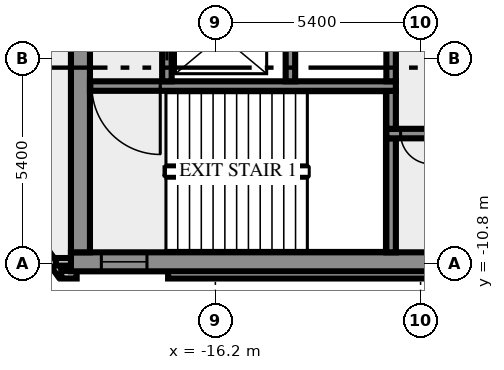
"""IFC4 building model, lengths in metres.
Left out: names, types, materials, properties, quantities, classifications, styles, units other than length and angle.
Written with IfcOpenShell. Run it as: python <this file> out.ifc"""

import sys

from ifc_helpers import new_model, si_unit, direction, frame, frame_2d, origin, place, context, subcontext, project, spatial, rectangle, extrude, element, fill, save


model = new_model("IFC4")
c1 = context("Model", 3, precision=1e-05, world=origin(), true_north=direction((0.0, 1.0)))
c2 = subcontext(c1, "Body", "Model", "MODEL_VIEW")
j1 = project(units=[si_unit("LENGTHUNIT", "METRE"), si_unit("PLANEANGLEUNIT", "RADIAN")], contexts=[c1])
p1 = place(None, origin())
s1 = spatial("IfcSite", under=j1, at=p1, CompositionType="ELEMENT")
p2 = place(p1, origin())
s2 = spatial("IfcBuilding", under=s1, at=p2, CompositionType="ELEMENT")
p3 = place(p2, frame((0.0, 0.0, 327.0)))
s3 = spatial("IfcBuildingStorey", under=s2, at=p3, CompositionType="ELEMENT", Elevation=327.0)
p4 = place(p3, frame((-21.833, -8.909, 0.0), z_axis=(0.0, 0.0, 1.0), x_axis=(0.587766567315, -0.809030569476, 0.0)))
e1 = element("IfcWall", 1, at=p4, inside=s3, PredefinedType="SOLIDWALL", context=c2, shape_type="SweptSolid", body=[
    extrude(rectangle(XDim=2.688, YDim=0.2, at=frame_2d((1.344, 0.0))), origin(), (0.0, 0.0, 1.0), 3.65),
])
p5 = place(p3, frame((-20.256, -11.088, 0.0), z_axis=(0.0, 0.0, 1.0), x_axis=(1.0, 0.0, 0.0)))
e2 = element("IfcWall", 2, at=p5, inside=s3, PredefinedType="SOLIDWALL", context=c2, shape_type="SweptSolid", body=[
    extrude(rectangle(XDim=0.406, YDim=0.2, at=frame_2d((0.203, 0.0))), origin(), (0.0, 0.0, 1.0), 3.65),
])
p6 = place(p3, frame((-17.444, -11.088, 0.0), z_axis=(0.0, 0.0, 1.0), x_axis=(1.0, 0.0, 0.0)))
e3 = element("IfcWall", 3, at=p6, inside=s3, PredefinedType="SOLIDWALL", context=c2, shape_type="SweptSolid", body=[
    extrude(rectangle(XDim=34.888, YDim=0.2, at=frame_2d((17.444, 0.0))), origin(), (0.0, 0.0, 1.0), 3.65),
])
p7 = place(p3, frame((-19.98, -10.75, 0.0), z_axis=(0.0, 0.0, 1.0), x_axis=(-1.0, 0.0, 0.0)))
e4 = element("IfcWall", 4, at=p7, inside=s3, PredefinedType="SOLIDWALL", context=c2, shape_type="SweptSolid", body=[
    extrude(rectangle(XDim=0.417, YDim=0.2, at=frame_2d((0.208, 0.0))), origin(), (0.0, 0.0, 1.0), 3.65),
])
p8 = place(p3, frame((-20.0, -10.75, 0.0), z_axis=(0.0, 0.0, 1.0), x_axis=(1.0, 0.0, 0.0)))
e5 = element("IfcWall", 5, at=p8, inside=s3, PredefinedType="SHEAR", context=c2, shape_type="SweptSolid", body=[
    extrude(rectangle(XDim=40.0, YDim=0.5, at=frame_2d((20.0, 0.0))), origin(), (0.0, 0.0, 1.0), 3.65),
])
p9 = place(p8, frame((0.8, 0.0, 1.0)))
e6 = element("IfcOpeningElement", 6, at=p9, cuts=e5, PredefinedType="OPENING", context=c2, shape_type="SweptSolid", body=[
    extrude(rectangle(XDim=1.2, YDim=1.2, at=frame_2d((0.6, 0.6))), frame((0.0, 0.26, 0.0), z_axis=(0.0, -1.0, 0.0), x_axis=(1.0, 0.0, 0.0)), (0.0, 0.0, 1.0), 0.52),
])
p10 = place(p8, frame((38.0, 0.0, 1.0)))
e7 = element("IfcOpeningElement", 7, at=p10, cuts=e5, PredefinedType="OPENING", context=c2, shape_type="SweptSolid", body=[
    extrude(rectangle(XDim=1.2, YDim=1.2, at=frame_2d((0.6, 0.6))), frame((0.0, 0.26, 0.0), z_axis=(0.0, -1.0, 0.0), x_axis=(1.0, 0.0, 0.0)), (0.0, 0.0, 1.0), 0.52),
])
p11 = place(p3, frame((-19.75, -10.5, 0.0), z_axis=(0.0, 0.0, 1.0), x_axis=(0.0, 1.0, 0.0)))
e8 = element("IfcWall", 8, at=p11, inside=s3, PredefinedType="SHEAR", context=c2, shape_type="SweptSolid", body=[
    extrude(rectangle(XDim=8.8, YDim=0.5, at=frame_2d((4.4, 0.0))), origin(), (0.0, 0.0, 1.0), 3.65),
])
p12 = place(p3, frame((-11.575, -10.5, 0.0), z_axis=(0.0, 0.0, 1.0), x_axis=(0.0, 1.0, 0.0)))
e9 = element("IfcWall", 9, at=p12, inside=s3, PredefinedType="SHEAR", context=c2, shape_type="SweptSolid", body=[
    extrude(rectangle(XDim=3.0, YDim=0.25, at=frame_2d((1.5, 0.0))), origin(), (0.0, 0.0, 1.0), 3.65),
])
p13 = place(p3, frame((11.7, -7.375, 0.0), z_axis=(0.0, 0.0, 1.0), x_axis=(-1.0, 0.0, 0.0)))
e10 = element("IfcWall", 10, at=p13, inside=s3, PredefinedType="SHEAR", context=c2, shape_type="SweptSolid", body=[
    extrude(rectangle(XDim=23.4, YDim=0.25, at=frame_2d((11.7, 0.0))), origin(), (0.0, 0.0, 1.0), 3.65),
])
p14 = place(p13, frame((22.225, 0.0, 0.0)))
e11 = element("IfcOpeningElement", 11, at=p14, cuts=e10, PredefinedType="OPENING", context=c2, shape_type="SweptSolid", body=[
    extrude(rectangle(XDim=0.8, YDim=2.1, at=frame_2d((0.4, 1.05))), frame((0.0, 0.135, 0.0), z_axis=(0.0, -1.0, 0.0), x_axis=(1.0, 0.0, 0.0)), (0.0, 0.0, 1.0), 0.27),
])
p15 = place(p13, frame((20.2, 0.0, 0.0)))
e12 = element("IfcOpeningElement", 12, at=p15, cuts=e10, PredefinedType="OPENING", context=c2, shape_type="SweptSolid", body=[
    extrude(rectangle(XDim=1.1, YDim=2.1, at=frame_2d((0.55, 1.05))), frame((0.0, 0.135, 0.0), z_axis=(0.0, -1.0, 0.0), x_axis=(1.0, 0.0, 0.0)), (0.0, 0.0, 1.0), 0.27),
])
p16 = place(p13, frame((17.7, 0.0, 0.0)))
e13 = element("IfcOpeningElement", 13, at=p16, cuts=e10, PredefinedType="OPENING", context=c2, shape_type="SweptSolid", body=[
    extrude(rectangle(XDim=1.1, YDim=2.1, at=frame_2d((0.55, 1.05))), frame((0.0, 0.135, 0.0), z_axis=(0.0, -1.0, 0.0), x_axis=(1.0, 0.0, 0.0)), (0.0, 0.0, 1.0), 0.27),
])
p17 = place(p13, frame((15.975, 0.0, 0.0)))
e14 = element("IfcOpeningElement", 14, at=p17, cuts=e10, PredefinedType="OPENING", context=c2, shape_type="SweptSolid", body=[
    extrude(rectangle(XDim=0.8, YDim=2.1, at=frame_2d((0.4, 1.05))), frame((0.0, 0.135, 0.0), z_axis=(0.0, -1.0, 0.0), x_axis=(1.0, 0.0, 0.0)), (0.0, 0.0, 1.0), 0.27),
])
p18 = place(p13, frame((14.5, 0.0, 0.0)))
e15 = element("IfcOpeningElement", 15, at=p18, cuts=e10, PredefinedType="OPENING", context=c2, shape_type="SweptSolid", body=[
    extrude(rectangle(XDim=0.9, YDim=2.1, at=frame_2d((0.45, 1.05))), frame((0.0, 0.135, 0.0), z_axis=(0.0, -1.0, 0.0), x_axis=(1.0, 0.0, 0.0)), (0.0, 0.0, 1.0), 0.27),
])
p19 = place(p13, frame((12.95, 0.0, 0.0)))
e16 = element("IfcOpeningElement", 16, at=p19, cuts=e10, PredefinedType="OPENING", context=c2, shape_type="SweptSolid", body=[
    extrude(rectangle(XDim=0.9, YDim=2.1, at=frame_2d((0.45, 1.05))), frame((0.0, 0.135, 0.0), z_axis=(0.0, -1.0, 0.0), x_axis=(1.0, 0.0, 0.0)), (0.0, 0.0, 1.0), 0.27),
])
p20 = place(p13, frame((11.475, 0.0, 0.0)))
e17 = element("IfcOpeningElement", 17, at=p20, cuts=e10, PredefinedType="OPENING", context=c2, shape_type="SweptSolid", body=[
    extrude(rectangle(XDim=0.9, YDim=2.1, at=frame_2d((0.45, 1.05))), frame((0.0, 0.135, 0.0), z_axis=(0.0, -1.0, 0.0), x_axis=(1.0, 0.0, 0.0)), (0.0, 0.0, 1.0), 0.27),
])
p21 = place(p13, frame((10.45, 0.0, 0.0)))
e18 = element("IfcOpeningElement", 18, at=p21, cuts=e10, PredefinedType="OPENING", context=c2, shape_type="SweptSolid", body=[
    extrude(rectangle(XDim=0.5, YDim=2.1, at=frame_2d((0.25, 1.05))), frame((0.0, 0.135, 0.0), z_axis=(0.0, -1.0, 0.0), x_axis=(1.0, 0.0, 0.0)), (0.0, 0.0, 1.0), 0.27),
])
p22 = place(p13, frame((7.713, 0.0, 0.0)))
e19 = element("IfcOpeningElement", 19, at=p22, cuts=e10, PredefinedType="OPENING", context=c2, shape_type="SweptSolid", body=[
    extrude(rectangle(XDim=0.9, YDim=2.1, at=frame_2d((0.45, 1.05))), frame((0.0, 0.135, 0.0), z_axis=(0.0, -1.0, 0.0), x_axis=(1.0, 0.0, 0.0)), (0.0, 0.0, 1.0), 0.27),
])
p23 = place(p13, frame((4.15, 0.0, 0.0)))
e20 = element("IfcOpeningElement", 20, at=p23, cuts=e10, PredefinedType="OPENING", context=c2, shape_type="SweptSolid", body=[
    extrude(rectangle(XDim=0.9, YDim=2.1, at=frame_2d((0.45, 1.05))), frame((0.0, 0.135, 0.0), z_axis=(0.0, -1.0, 0.0), x_axis=(1.0, 0.0, 0.0)), (0.0, 0.0, 1.0), 0.27),
])
p24 = place(p13, frame((1.138, 0.0, 0.0)))
e21 = element("IfcOpeningElement", 21, at=p24, cuts=e10, PredefinedType="OPENING", context=c2, shape_type="SweptSolid", body=[
    extrude(rectangle(XDim=0.9, YDim=2.1, at=frame_2d((0.45, 1.05))), frame((0.0, 0.135, 0.0), z_axis=(0.0, -1.0, 0.0), x_axis=(1.0, 0.0, 0.0)), (0.0, 0.0, 1.0), 0.27),
])
p25 = place(p3, frame((-11.575, -7.25, 0.0), z_axis=(0.0, 0.0, 1.0), x_axis=(0.0, 1.0, 0.0)))
e22 = element("IfcWall", 22, at=p25, inside=s3, PredefinedType="SHEAR", context=c2, shape_type="SweptSolid", body=[
    extrude(rectangle(XDim=1.0, YDim=0.25, at=frame_2d((0.5, 0.0))), origin(), (0.0, 0.0, 1.0), 3.65),
])
p26 = place(p3, frame((-11.45, -6.125, 0.0), z_axis=(0.0, 0.0, 1.0), x_axis=(-1.0, 0.0, 0.0)))
e23 = element("IfcWall", 23, at=p26, inside=s3, PredefinedType="SHEAR", context=c2, shape_type="SweptSolid", body=[
    extrude(rectangle(XDim=8.05, YDim=0.25, at=frame_2d((4.025, 0.0))), origin(), (0.0, 0.0, 1.0), 3.65),
])
p27 = place(p26, frame((6.2, 0.0, 0.0)))
e24 = element("IfcOpeningElement", 24, at=p27, cuts=e23, PredefinedType="OPENING", context=c2, shape_type="SweptSolid", body=[
    extrude(rectangle(XDim=1.8, YDim=2.1, at=frame_2d((0.9, 1.05))), frame((0.0, 0.135, 0.0), z_axis=(0.0, -1.0, 0.0), x_axis=(1.0, 0.0, 0.0)), (0.0, 0.0, 1.0), 0.27),
])
p28 = place(p3, frame((-17.475, -6.0, 0.0), z_axis=(0.0, 0.0, 1.0), x_axis=(0.0, 1.0, 0.0)))
e25 = element("IfcWall", 25, at=p28, inside=s3, PredefinedType="SHEAR", context=c2, shape_type="SweptSolid", body=[
    extrude(rectangle(XDim=4.3, YDim=0.25, at=frame_2d((2.15, 0.0))), origin(), (0.0, 0.0, 1.0), 3.65),
])
p29 = place(p28, frame((0.55, 0.0, 0.0)))
e26 = element("IfcOpeningElement", 26, at=p29, cuts=e25, PredefinedType="OPENING", context=c2, shape_type="SweptSolid", body=[
    extrude(rectangle(XDim=1.3, YDim=2.1, at=frame_2d((0.65, 1.05))), frame((0.0, 0.135, 0.0), z_axis=(0.0, -1.0, 0.0), x_axis=(1.0, 0.0, 0.0)), (0.0, 0.0, 1.0), 0.27),
])
for number, where, z_axis, x_axis in (
    (27, (-14.225, -6.0, 0.0), (0.0, 0.0, 1.0), (0.0, 1.0, 0.0)),
    (28, (-11.575, -6.0, 0.0), (0.0, 0.0, 1.0), (0.0, 1.0, 0.0)),
):
    element("IfcWall", number, at=place(p3, frame(where, z_axis=z_axis, x_axis=x_axis)), inside=s3, PredefinedType="SHEAR", context=c2, shape_type="SweptSolid", body=[
        extrude(rectangle(XDim=1.75, YDim=0.25, at=frame_2d((0.875, 0.0))), origin(), (0.0, 0.0, 1.0), 3.65),
    ])
p30 = place(p9, origin())
e29 = element("IfcWindow", 29, at=p30, inside=s3, PartitioningType="SINGLE_PANEL", PredefinedType="WINDOW", context=c2, shape_type="SweptSolid", body=[
    extrude(rectangle(XDim=1.2, YDim=1.2, at=frame_2d((0.6, 0.6))), frame((0.0, 0.03, 0.0), z_axis=(0.0, -1.0, 0.0), x_axis=(1.0, 0.0, 0.0)), (0.0, 0.0, 1.0), 0.06),
])
fill(e6, e29)
p31 = place(p14, origin())
e30 = element("IfcDoor", 30, at=p31, inside=s3, OperationType="SINGLE_SWING_RIGHT", PredefinedType="DOOR", context=c2, shape_type="SweptSolid", body=[
    extrude(rectangle(XDim=0.8, YDim=2.1, at=frame_2d((0.4, 1.05))), frame((0.0, 0.025, 0.0), z_axis=(0.0, -1.0, 0.0), x_axis=(1.0, 0.0, 0.0)), (0.0, 0.0, 1.0), 0.05),
])
fill(e11, e30)
p32 = place(p27, origin())
e31 = element("IfcDoor", 31, at=p32, inside=s3, OperationType="DOUBLE_DOOR_SINGLE_SWING", PredefinedType="DOOR", context=c2, shape_type="SweptSolid", body=[
    extrude(rectangle(XDim=1.8, YDim=2.1, at=frame_2d((0.9, 1.05))), frame((0.0, 0.025, 0.0), z_axis=(0.0, -1.0, 0.0), x_axis=(1.0, 0.0, 0.0)), (0.0, 0.0, 1.0), 0.05),
])
fill(e24, e31)
p33 = place(p29, origin())
e32 = element("IfcDoor", 32, at=p33, inside=s3, OperationType="DOUBLE_DOOR_SLIDING", PredefinedType="DOOR", context=c2, shape_type="SweptSolid", body=[
    extrude(rectangle(XDim=1.3, YDim=2.1, at=frame_2d((0.65, 1.05))), frame((0.0, 0.025, 0.0), z_axis=(0.0, -1.0, 0.0), x_axis=(1.0, 0.0, 0.0)), (0.0, 0.0, 1.0), 0.05),
])
fill(e26, e32)
save(model, sys.argv[1])
